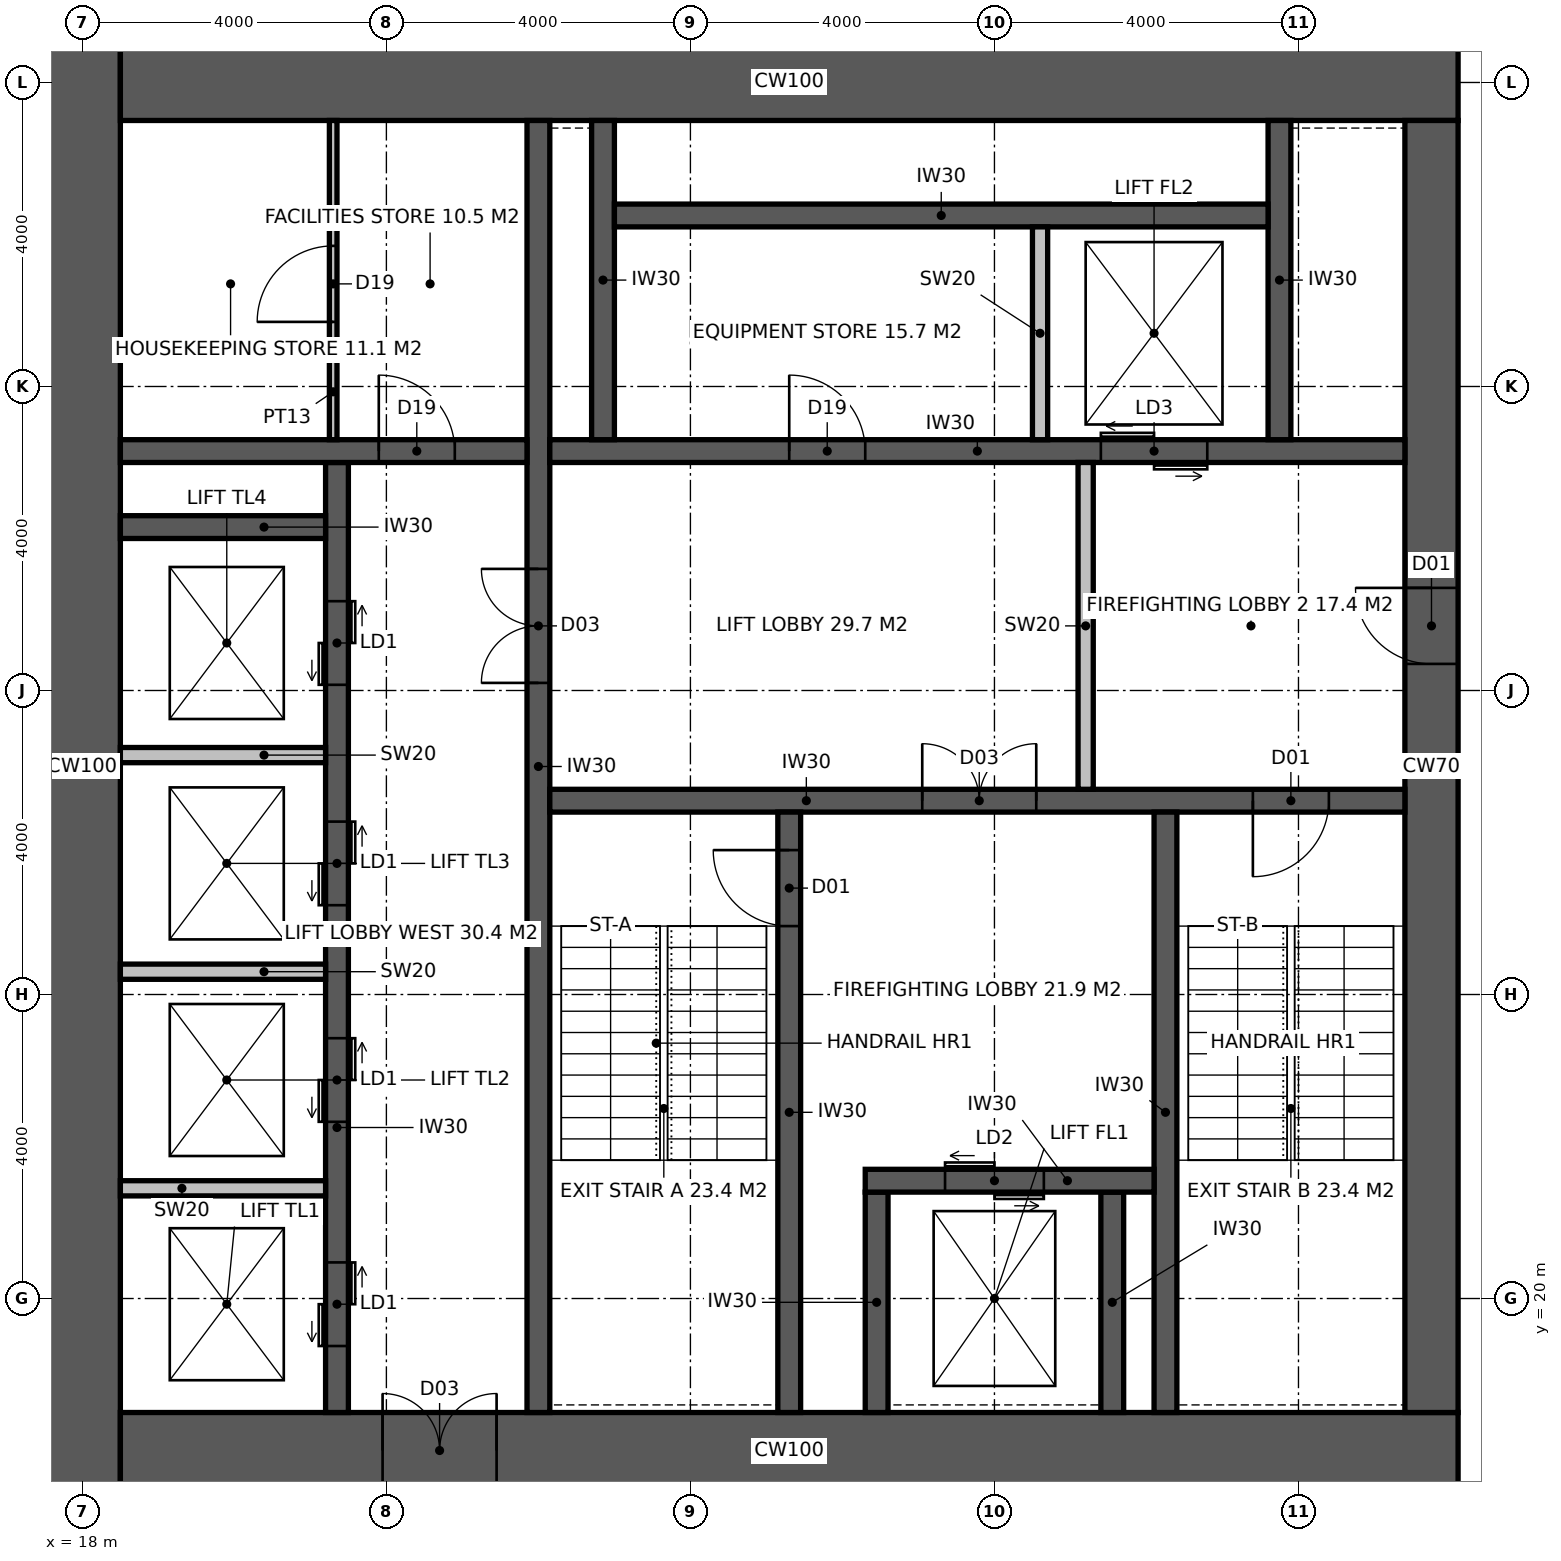
"""IFC4 building model, lengths in metres.
Left out: names, types, materials, properties, quantities, classifications, styles, units other than length and angle.
Written with IfcOpenShell. Run it as: python <this file> out.ifc"""

import sys

from ifc_helpers import new_model, si_unit, direction, frame, frame_2d, origin, place, context, subcontext, project, spatial, rectangle, extrude, element, fill, save


model = new_model("IFC4")
c1 = context("Model", 3, precision=1e-05, world=origin(), true_north=direction((0.0, 1.0)))
c2 = subcontext(c1, "Body", "Model", "MODEL_VIEW")
j1 = project(units=[si_unit("LENGTHUNIT", "METRE"), si_unit("PLANEANGLEUNIT", "RADIAN")], contexts=[c1])
p1 = place(None, origin())
s1 = spatial("IfcSite", under=j1, at=p1, CompositionType="ELEMENT")
p2 = place(p1, origin())
s2 = spatial("IfcBuilding", under=s1, at=p2, CompositionType="ELEMENT")
p3 = place(p2, frame((0.0, 0.0, 286.2)))
s3 = spatial("IfcBuildingStorey", under=s2, at=p3, CompositionType="ELEMENT", Elevation=286.2)
p4 = place(p3, frame((18.0, 17.5, -0.15), z_axis=(0.0, 0.0, 1.0), x_axis=(0.0, 1.0, 0.0)))
e1 = element("IfcWall", 1, at=p4, inside=s3, PredefinedType="SHEAR", context=c2, shape_type="SweptSolid", body=[
    extrude(rectangle(XDim=19.0, YDim=1.0, at=frame_2d((9.5, 0.0))), origin(), (0.0, 0.0, 1.0), 4.0),
])
p5 = place(p3, frame((18.5, 18.0, -0.15), z_axis=(0.0, 0.0, 1.0), x_axis=(1.0, 0.0, 0.0)))
e2 = element("IfcWall", 2, at=p5, inside=s3, PredefinedType="SHEAR", context=c2, shape_type="SweptSolid", body=[
    extrude(rectangle(XDim=17.6, YDim=1.0, at=frame_2d((8.8, 0.0))), origin(), (0.0, 0.0, 1.0), 4.0),
])
p6 = place(p5, frame((3.45, 0.0, 0.15)))
e3 = element("IfcOpeningElement", 3, at=p6, cuts=e2, PredefinedType="OPENING", context=c2, shape_type="SweptSolid", body=[
    extrude(rectangle(XDim=1.5, YDim=2.4, at=frame_2d((0.75, 1.2))), frame((0.0, 0.51, 0.0), z_axis=(0.0, -1.0, 0.0), x_axis=(1.0, 0.0, 0.0)), (0.0, 0.0, 1.0), 1.02),
])
p7 = place(p3, frame((18.5, 36.0, -0.15), z_axis=(0.0, 0.0, 1.0), x_axis=(1.0, 0.0, 0.0)))
e4 = element("IfcWall", 4, at=p7, inside=s3, PredefinedType="SHEAR", context=c2, shape_type="SweptSolid", body=[
    extrude(rectangle(XDim=17.6, YDim=1.0, at=frame_2d((8.8, 0.0))), origin(), (0.0, 0.0, 1.0), 4.0),
])
p8 = place(p3, frame((35.75, 18.5, -0.15), z_axis=(0.0, 0.0, 1.0), x_axis=(0.0, 1.0, 0.0)))
e5 = element("IfcWall", 5, at=p8, inside=s3, PredefinedType="SHEAR", context=c2, shape_type="SweptSolid", body=[
    extrude(rectangle(XDim=17.0, YDim=0.7, at=frame_2d((8.5, 0.0))), origin(), (0.0, 0.0, 1.0), 4.0),
])
p9 = place(p8, frame((9.85, 0.0, 0.15)))
e6 = element("IfcOpeningElement", 6, at=p9, cuts=e5, PredefinedType="OPENING", context=c2, shape_type="SweptSolid", body=[
    extrude(rectangle(XDim=1.0, YDim=2.2, at=frame_2d((0.5, 1.1))), frame((0.0, 0.36, 0.0), z_axis=(0.0, -1.0, 0.0), x_axis=(1.0, 0.0, 0.0)), (0.0, 0.0, 1.0), 0.72),
])
p10 = place(p3, frame((24.0, 18.5, -0.15), z_axis=(0.0, 0.0, 1.0), x_axis=(0.0, 1.0, 0.0)))
e7 = element("IfcWall", 7, at=p10, inside=s3, PredefinedType="SHEAR", context=c2, shape_type="SweptSolid", body=[
    extrude(rectangle(XDim=17.0, YDim=0.3, at=frame_2d((8.5, 0.0))), origin(), (0.0, 0.0, 1.0), 4.0),
])
p11 = place(p10, frame((9.6, 0.0, 0.15)))
e8 = element("IfcOpeningElement", 8, at=p11, cuts=e7, PredefinedType="OPENING", context=c2, shape_type="SweptSolid", body=[
    extrude(rectangle(XDim=1.5, YDim=2.4, at=frame_2d((0.75, 1.2))), frame((0.0, 0.16, 0.0), z_axis=(0.0, -1.0, 0.0), x_axis=(1.0, 0.0, 0.0)), (0.0, 0.0, 1.0), 0.32),
])
p12 = place(p3, frame((24.15, 26.55, -0.15), z_axis=(0.0, 0.0, 1.0), x_axis=(1.0, 0.0, 0.0)))
e9 = element("IfcWall", 9, at=p12, inside=s3, PredefinedType="SHEAR", context=c2, shape_type="SweptSolid", body=[
    extrude(rectangle(XDim=11.25, YDim=0.3, at=frame_2d((5.625, 0.0))), origin(), (0.0, 0.0, 1.0), 4.0),
])
p13 = place(p12, frame((9.25, 0.0, 0.15)))
e10 = element("IfcOpeningElement", 10, at=p13, cuts=e9, PredefinedType="OPENING", context=c2, shape_type="SweptSolid", body=[
    extrude(rectangle(XDim=1.0, YDim=2.2, at=frame_2d((0.5, 1.1))), frame((0.0, 0.16, 0.0), z_axis=(0.0, -1.0, 0.0), x_axis=(1.0, 0.0, 0.0)), (0.0, 0.0, 1.0), 0.32),
])
p14 = place(p12, frame((4.9, 0.0, 0.15)))
e11 = element("IfcOpeningElement", 11, at=p14, cuts=e9, PredefinedType="OPENING", context=c2, shape_type="SweptSolid", body=[
    extrude(rectangle(XDim=1.5, YDim=2.4, at=frame_2d((0.75, 1.2))), frame((0.0, 0.16, 0.0), z_axis=(0.0, -1.0, 0.0), x_axis=(1.0, 0.0, 0.0)), (0.0, 0.0, 1.0), 0.32),
])
p15 = place(p3, frame((27.3, 18.5, -0.15), z_axis=(0.0, 0.0, 1.0), x_axis=(0.0, 1.0, 0.0)))
e12 = element("IfcWall", 12, at=p15, inside=s3, PredefinedType="SHEAR", context=c2, shape_type="SweptSolid", body=[
    extrude(rectangle(XDim=7.9, YDim=0.3, at=frame_2d((3.95, 0.0))), origin(), (0.0, 0.0, 1.0), 4.0),
])
p16 = place(p15, frame((6.4, 0.0, 0.15)))
e13 = element("IfcOpeningElement", 13, at=p16, cuts=e12, PredefinedType="OPENING", context=c2, shape_type="SweptSolid", body=[
    extrude(rectangle(XDim=1.0, YDim=2.2, at=frame_2d((0.5, 1.1))), frame((0.0, 0.16, 0.0), z_axis=(0.0, -1.0, 0.0), x_axis=(1.0, 0.0, 0.0)), (0.0, 0.0, 1.0), 0.32),
])
p17 = place(p3, frame((32.25, 18.5, -0.15), z_axis=(0.0, 0.0, 1.0), x_axis=(0.0, 1.0, 0.0)))
e14 = element("IfcWall", 14, at=p17, inside=s3, PredefinedType="SHEAR", context=c2, shape_type="SweptSolid", body=[
    extrude(rectangle(XDim=7.9, YDim=0.3, at=frame_2d((3.95, 0.0))), origin(), (0.0, 0.0, 1.0), 4.0),
])
for number, where, z_axis, x_axis in (
    (15, (28.45, 18.5, -0.15), (0.0, 0.0, 1.0), (0.0, 1.0, 0.0)),
    (16, (31.55, 18.5, -0.15), (0.0, 0.0, 1.0), (0.0, 1.0, 0.0)),
):
    element("IfcWall", number, at=place(p3, frame(where, z_axis=z_axis, x_axis=x_axis)), inside=s3, PredefinedType="SHEAR", context=c2, shape_type="SweptSolid", body=[
        extrude(rectangle(XDim=2.9, YDim=0.3, at=frame_2d((1.45, 0.0))), origin(), (0.0, 0.0, 1.0), 4.0),
    ])
p18 = place(p3, frame((28.3, 21.55, -0.15), z_axis=(0.0, 0.0, 1.0), x_axis=(1.0, 0.0, 0.0)))
e17 = element("IfcWall", 17, at=p18, inside=s3, PredefinedType="SHEAR", context=c2, shape_type="SweptSolid", body=[
    extrude(rectangle(XDim=3.8, YDim=0.3, at=frame_2d((1.9, 0.0))), origin(), (0.0, 0.0, 1.0), 4.0),
])
p19 = place(p18, frame((1.05, 0.0, 0.15)))
e18 = element("IfcOpeningElement", 18, at=p19, cuts=e17, PredefinedType="OPENING", context=c2, shape_type="SweptSolid", body=[
    extrude(rectangle(XDim=1.3, YDim=2.4, at=frame_2d((0.65, 1.2))), frame((0.0, 0.16, 0.0), z_axis=(0.0, -1.0, 0.0), x_axis=(1.0, 0.0, 0.0)), (0.0, 0.0, 1.0), 0.32),
])
p20 = place(p3, frame((24.15, 31.15, -0.15), z_axis=(0.0, 0.0, 1.0), x_axis=(1.0, 0.0, 0.0)))
e19 = element("IfcWall", 19, at=p20, inside=s3, PredefinedType="SHEAR", context=c2, shape_type="SweptSolid", body=[
    extrude(rectangle(XDim=11.25, YDim=0.3, at=frame_2d((5.625, 0.0))), origin(), (0.0, 0.0, 1.0), 4.0),
])
p21 = place(p20, frame((3.15, 0.0, 0.15)))
e20 = element("IfcOpeningElement", 20, at=p21, cuts=e19, PredefinedType="OPENING", context=c2, shape_type="SweptSolid", body=[
    extrude(rectangle(XDim=1.0, YDim=2.2, at=frame_2d((0.5, 1.1))), frame((0.0, 0.16, 0.0), z_axis=(0.0, -1.0, 0.0), x_axis=(1.0, 0.0, 0.0)), (0.0, 0.0, 1.0), 0.32),
])
p22 = place(p20, frame((7.25, 0.0, 0.15)))
e21 = element("IfcOpeningElement", 21, at=p22, cuts=e19, PredefinedType="OPENING", context=c2, shape_type="SweptSolid", body=[
    extrude(rectangle(XDim=1.4, YDim=2.4, at=frame_2d((0.7, 1.2))), frame((0.0, 0.16, 0.0), z_axis=(0.0, -1.0, 0.0), x_axis=(1.0, 0.0, 0.0)), (0.0, 0.0, 1.0), 0.32),
])
p23 = place(p3, frame((21.35, 18.5, -0.15), z_axis=(0.0, 0.0, 1.0), x_axis=(0.0, 1.0, 0.0)))
e22 = element("IfcWall", 22, at=p23, inside=s3, PredefinedType="SHEAR", context=c2, shape_type="SweptSolid", body=[
    extrude(rectangle(XDim=12.5, YDim=0.3, at=frame_2d((6.25, 0.0))), origin(), (0.0, 0.0, 1.0), 4.0),
])
p24 = place(p23, frame((0.875, 0.0, 0.15)))
e23 = element("IfcOpeningElement", 23, at=p24, cuts=e22, PredefinedType="OPENING", context=c2, shape_type="SweptSolid", body=[
    extrude(rectangle(XDim=1.1, YDim=2.2, at=frame_2d((0.55, 1.1))), frame((0.0, 0.16, 0.0), z_axis=(0.0, -1.0, 0.0), x_axis=(1.0, 0.0, 0.0)), (0.0, 0.0, 1.0), 0.32),
])
p25 = place(p23, frame((3.825, 0.0, 0.15)))
e24 = element("IfcOpeningElement", 24, at=p25, cuts=e22, PredefinedType="OPENING", context=c2, shape_type="SweptSolid", body=[
    extrude(rectangle(XDim=1.1, YDim=2.2, at=frame_2d((0.55, 1.1))), frame((0.0, 0.16, 0.0), z_axis=(0.0, -1.0, 0.0), x_axis=(1.0, 0.0, 0.0)), (0.0, 0.0, 1.0), 0.32),
])
p26 = place(p23, frame((6.675, 0.0, 0.15)))
e25 = element("IfcOpeningElement", 25, at=p26, cuts=e22, PredefinedType="OPENING", context=c2, shape_type="SweptSolid", body=[
    extrude(rectangle(XDim=1.1, YDim=2.2, at=frame_2d((0.55, 1.1))), frame((0.0, 0.16, 0.0), z_axis=(0.0, -1.0, 0.0), x_axis=(1.0, 0.0, 0.0)), (0.0, 0.0, 1.0), 0.32),
])
p27 = place(p23, frame((9.575, 0.0, 0.15)))
e26 = element("IfcOpeningElement", 26, at=p27, cuts=e22, PredefinedType="OPENING", context=c2, shape_type="SweptSolid", body=[
    extrude(rectangle(XDim=1.1, YDim=2.2, at=frame_2d((0.55, 1.1))), frame((0.0, 0.16, 0.0), z_axis=(0.0, -1.0, 0.0), x_axis=(1.0, 0.0, 0.0)), (0.0, 0.0, 1.0), 0.32),
])
p28 = place(p3, frame((18.5, 31.15, -0.15), z_axis=(0.0, 0.0, 1.0), x_axis=(1.0, 0.0, 0.0)))
e27 = element("IfcWall", 27, at=p28, inside=s3, PredefinedType="SHEAR", context=c2, shape_type="SweptSolid", body=[
    extrude(rectangle(XDim=5.35, YDim=0.3, at=frame_2d((2.675, 0.0))), origin(), (0.0, 0.0, 1.0), 4.0),
])
p29 = place(p28, frame((3.4, 0.0, 0.15)))
e28 = element("IfcOpeningElement", 28, at=p29, cuts=e27, PredefinedType="OPENING", context=c2, shape_type="SweptSolid", body=[
    extrude(rectangle(XDim=1.0, YDim=2.2, at=frame_2d((0.5, 1.1))), frame((0.0, 0.16, 0.0), z_axis=(0.0, -1.0, 0.0), x_axis=(1.0, 0.0, 0.0)), (0.0, 0.0, 1.0), 0.32),
])
p30 = place(p3, frame((18.5, 30.15, -0.15), z_axis=(0.0, 0.0, 1.0), x_axis=(1.0, 0.0, 0.0)))
e29 = element("IfcWall", 29, at=p30, inside=s3, PredefinedType="SHEAR", context=c2, shape_type="SweptSolid", body=[
    extrude(rectangle(XDim=2.7, YDim=0.3, at=frame_2d((1.35, 0.0))), origin(), (0.0, 0.0, 1.0), 4.0),
])
for number, where, z_axis, x_axis in (
    (30, (24.85, 31.3, -0.15), (0.0, 0.0, 1.0), (0.0, 1.0, 0.0)),
    (31, (33.75, 31.3, -0.15), (0.0, 0.0, 1.0), (0.0, 1.0, 0.0)),
):
    element("IfcWall", number, at=place(p3, frame(where, z_axis=z_axis, x_axis=x_axis)), inside=s3, PredefinedType="SHEAR", context=c2, shape_type="SweptSolid", body=[
        extrude(rectangle(XDim=4.2, YDim=0.3, at=frame_2d((2.1, 0.0))), origin(), (0.0, 0.0, 1.0), 4.0),
    ])
p31 = place(p3, frame((25.0, 34.25, -0.15), z_axis=(0.0, 0.0, 1.0), x_axis=(1.0, 0.0, 0.0)))
e32 = element("IfcWall", 32, at=p31, inside=s3, PredefinedType="SHEAR", context=c2, shape_type="SweptSolid", body=[
    extrude(rectangle(XDim=8.6, YDim=0.3, at=frame_2d((4.3, 0.0))), origin(), (0.0, 0.0, 1.0), 4.0),
])
p32 = place(p3, frame((30.6, 31.3, -0.15), z_axis=(0.0, 0.0, 1.0), x_axis=(0.0, 1.0, 0.0)))
e33 = element("IfcWall", 33, at=p32, inside=s3, PredefinedType="SOLIDWALL", context=c2, shape_type="SweptSolid", body=[
    extrude(rectangle(XDim=2.8, YDim=0.2, at=frame_2d((1.4, 0.0))), origin(), (0.0, 0.0, 1.0), 4.0),
])
for number, where, z_axis, x_axis in (
    (34, (18.5, 21.45, -0.15), (0.0, 0.0, 1.0), (1.0, 0.0, 0.0)),
    (35, (18.5, 24.3, -0.15), (0.0, 0.0, 1.0), (1.0, 0.0, 0.0)),
    (36, (18.5, 27.15, -0.15), (0.0, 0.0, 1.0), (1.0, 0.0, 0.0)),
):
    element("IfcWall", number, at=place(p3, frame(where, z_axis=z_axis, x_axis=x_axis)), inside=s3, PredefinedType="SOLIDWALL", context=c2, shape_type="SweptSolid", body=[
        extrude(rectangle(XDim=2.7, YDim=0.2, at=frame_2d((1.35, 0.0))), origin(), (0.0, 0.0, 1.0), 4.0),
    ])
p33 = place(p3, frame((31.2, 26.7, 0.0), z_axis=(0.0, 0.0, 1.0), x_axis=(0.0, 1.0, 0.0)))
e37 = element("IfcWall", 37, at=p33, inside=s3, PredefinedType="SOLIDWALL", context=c2, shape_type="SweptSolid", body=[
    extrude(rectangle(XDim=4.3, YDim=0.2, at=frame_2d((2.15, 0.0))), origin(), (0.0, 0.0, 1.0), 3.85),
])
p34 = place(p3, frame((21.3, 31.3, 0.0), z_axis=(0.0, 0.0, 1.0), x_axis=(0.0, 1.0, 0.0)))
e38 = element("IfcWall", 38, at=p34, inside=s3, PredefinedType="PARTITIONING", context=c2, shape_type="SweptSolid", body=[
    extrude(rectangle(XDim=4.2, YDim=0.1, at=frame_2d((2.1, 0.0))), origin(), (0.0, 0.0, 1.0), 3.85),
])
p35 = place(p34, frame((1.55, 0.0, 0.0)))
e39 = element("IfcOpeningElement", 39, at=p35, cuts=e38, PredefinedType="OPENING", context=c2, shape_type="SweptSolid", body=[
    extrude(rectangle(XDim=1.0, YDim=2.2, at=frame_2d((0.5, 1.1))), frame((0.0, 0.06, 0.0), z_axis=(0.0, -1.0, 0.0), x_axis=(1.0, 0.0, 0.0)), (0.0, 0.0, 1.0), 0.12),
])
p36 = place(p16, origin())
e40 = element("IfcDoor", 40, at=p36, inside=s3, OperationType="SINGLE_SWING_RIGHT", PredefinedType="DOOR", context=c2, shape_type="SweptSolid", body=[
    extrude(rectangle(XDim=1.0, YDim=2.2, at=frame_2d((0.5, 1.1))), frame((0.0, 0.025, 0.0), z_axis=(0.0, -1.0, 0.0), x_axis=(1.0, 0.0, 0.0)), (0.0, 0.0, 1.0), 0.05),
])
fill(e13, e40)
p37 = place(p13, frame((1.0, 0.0, 0.0), z_axis=(0.0, 0.0, 1.0), x_axis=(-1.0, 0.0, 0.0)))
e41 = element("IfcDoor", 41, at=p37, inside=s3, OperationType="SINGLE_SWING_RIGHT", PredefinedType="DOOR", context=c2, shape_type="SweptSolid", body=[
    extrude(rectangle(XDim=1.0, YDim=2.2, at=frame_2d((0.5, 1.1))), frame((0.0, 0.025, 0.0), z_axis=(0.0, -1.0, 0.0), x_axis=(1.0, 0.0, 0.0)), (0.0, 0.0, 1.0), 0.05),
])
fill(e10, e41)
p38 = place(p9, origin())
e42 = element("IfcDoor", 42, at=p38, inside=s3, OperationType="SINGLE_SWING_RIGHT", PredefinedType="DOOR", context=c2, shape_type="SweptSolid", body=[
    extrude(rectangle(XDim=1.0, YDim=2.2, at=frame_2d((0.5, 1.1))), frame((0.0, 0.025, 0.0), z_axis=(0.0, -1.0, 0.0), x_axis=(1.0, 0.0, 0.0)), (0.0, 0.0, 1.0), 0.05),
])
fill(e6, e42)
p39 = place(p14, origin())
e43 = element("IfcDoor", 43, at=p39, inside=s3, OperationType="DOUBLE_DOOR_DOUBLE_SWING", PredefinedType="DOOR", context=c2, shape_type="SweptSolid", body=[
    extrude(rectangle(XDim=1.5, YDim=2.4, at=frame_2d((0.75, 1.2))), frame((0.0, 0.025, 0.0), z_axis=(0.0, -1.0, 0.0), x_axis=(1.0, 0.0, 0.0)), (0.0, 0.0, 1.0), 0.05),
])
fill(e11, e43)
p40 = place(p11, origin())
e44 = element("IfcDoor", 44, at=p40, inside=s3, OperationType="DOUBLE_DOOR_DOUBLE_SWING", PredefinedType="DOOR", context=c2, shape_type="SweptSolid", body=[
    extrude(rectangle(XDim=1.5, YDim=2.4, at=frame_2d((0.75, 1.2))), frame((0.0, 0.025, 0.0), z_axis=(0.0, -1.0, 0.0), x_axis=(1.0, 0.0, 0.0)), (0.0, 0.0, 1.0), 0.05),
])
fill(e8, e44)
p41 = place(p29, origin())
e45 = element("IfcDoor", 45, at=p41, inside=s3, OperationType="SINGLE_SWING_LEFT", PredefinedType="DOOR", context=c2, shape_type="SweptSolid", body=[
    extrude(rectangle(XDim=1.0, YDim=2.2, at=frame_2d((0.5, 1.1))), frame((0.0, 0.025, 0.0), z_axis=(0.0, -1.0, 0.0), x_axis=(1.0, 0.0, 0.0)), (0.0, 0.0, 1.0), 0.05),
])
fill(e28, e45)
p42 = place(p35, origin())
e46 = element("IfcDoor", 46, at=p42, inside=s3, OperationType="SINGLE_SWING_LEFT", PredefinedType="DOOR", context=c2, shape_type="SweptSolid", body=[
    extrude(rectangle(XDim=1.0, YDim=2.2, at=frame_2d((0.5, 1.1))), frame((0.0, 0.025, 0.0), z_axis=(0.0, -1.0, 0.0), x_axis=(1.0, 0.0, 0.0)), (0.0, 0.0, 1.0), 0.05),
])
fill(e39, e46)
p43 = place(p21, origin())
e47 = element("IfcDoor", 47, at=p43, inside=s3, OperationType="SINGLE_SWING_LEFT", PredefinedType="DOOR", context=c2, shape_type="SweptSolid", body=[
    extrude(rectangle(XDim=1.0, YDim=2.2, at=frame_2d((0.5, 1.1))), frame((0.0, 0.025, 0.0), z_axis=(0.0, -1.0, 0.0), x_axis=(1.0, 0.0, 0.0)), (0.0, 0.0, 1.0), 0.05),
])
fill(e20, e47)
p44 = place(p6, origin())
e48 = element("IfcDoor", 48, at=p44, inside=s3, OperationType="DOUBLE_DOOR_DOUBLE_SWING", PredefinedType="DOOR", context=c2, shape_type="SweptSolid", body=[
    extrude(rectangle(XDim=1.5, YDim=2.4, at=frame_2d((0.75, 1.2))), frame((0.0, 0.025, 0.0), z_axis=(0.0, -1.0, 0.0), x_axis=(1.0, 0.0, 0.0)), (0.0, 0.0, 1.0), 0.05),
])
fill(e3, e48)
p45 = place(p19, origin())
e49 = element("IfcDoor", 49, at=p45, inside=s3, OperationType="DOUBLE_DOOR_SLIDING", PredefinedType="DOOR", context=c2, shape_type="SweptSolid", body=[
    extrude(rectangle(XDim=1.3, YDim=2.4, at=frame_2d((0.65, 1.2))), frame((0.0, 0.025, 0.0), z_axis=(0.0, -1.0, 0.0), x_axis=(1.0, 0.0, 0.0)), (0.0, 0.0, 1.0), 0.05),
])
fill(e18, e49)
p46 = place(p22, origin())
e50 = element("IfcDoor", 50, at=p46, inside=s3, OperationType="DOUBLE_DOOR_SLIDING", PredefinedType="DOOR", context=c2, shape_type="SweptSolid", body=[
    extrude(rectangle(XDim=1.4, YDim=2.4, at=frame_2d((0.7, 1.2))), frame((0.0, 0.025, 0.0), z_axis=(0.0, -1.0, 0.0), x_axis=(1.0, 0.0, 0.0)), (0.0, 0.0, 1.0), 0.05),
])
fill(e21, e50)
p47 = place(p24, origin())
e51 = element("IfcDoor", 51, at=p47, inside=s3, OperationType="DOUBLE_DOOR_SLIDING", PredefinedType="DOOR", context=c2, shape_type="SweptSolid", body=[
    extrude(rectangle(XDim=1.1, YDim=2.2, at=frame_2d((0.55, 1.1))), frame((0.0, 0.025, 0.0), z_axis=(0.0, -1.0, 0.0), x_axis=(1.0, 0.0, 0.0)), (0.0, 0.0, 1.0), 0.05),
])
fill(e23, e51)
p48 = place(p25, origin())
e52 = element("IfcDoor", 52, at=p48, inside=s3, OperationType="DOUBLE_DOOR_SLIDING", PredefinedType="DOOR", context=c2, shape_type="SweptSolid", body=[
    extrude(rectangle(XDim=1.1, YDim=2.2, at=frame_2d((0.55, 1.1))), frame((0.0, 0.025, 0.0), z_axis=(0.0, -1.0, 0.0), x_axis=(1.0, 0.0, 0.0)), (0.0, 0.0, 1.0), 0.05),
])
fill(e24, e52)
p49 = place(p26, origin())
e53 = element("IfcDoor", 53, at=p49, inside=s3, OperationType="DOUBLE_DOOR_SLIDING", PredefinedType="DOOR", context=c2, shape_type="SweptSolid", body=[
    extrude(rectangle(XDim=1.1, YDim=2.2, at=frame_2d((0.55, 1.1))), frame((0.0, 0.025, 0.0), z_axis=(0.0, -1.0, 0.0), x_axis=(1.0, 0.0, 0.0)), (0.0, 0.0, 1.0), 0.05),
])
fill(e25, e53)
p50 = place(p27, origin())
e54 = element("IfcDoor", 54, at=p50, inside=s3, OperationType="DOUBLE_DOOR_SLIDING", PredefinedType="DOOR", context=c2, shape_type="SweptSolid", body=[
    extrude(rectangle(XDim=1.1, YDim=2.2, at=frame_2d((0.55, 1.1))), frame((0.0, 0.025, 0.0), z_axis=(0.0, -1.0, 0.0), x_axis=(1.0, 0.0, 0.0)), (0.0, 0.0, 1.0), 0.05),
])
fill(e26, e54)
save(model, sys.argv[1])
